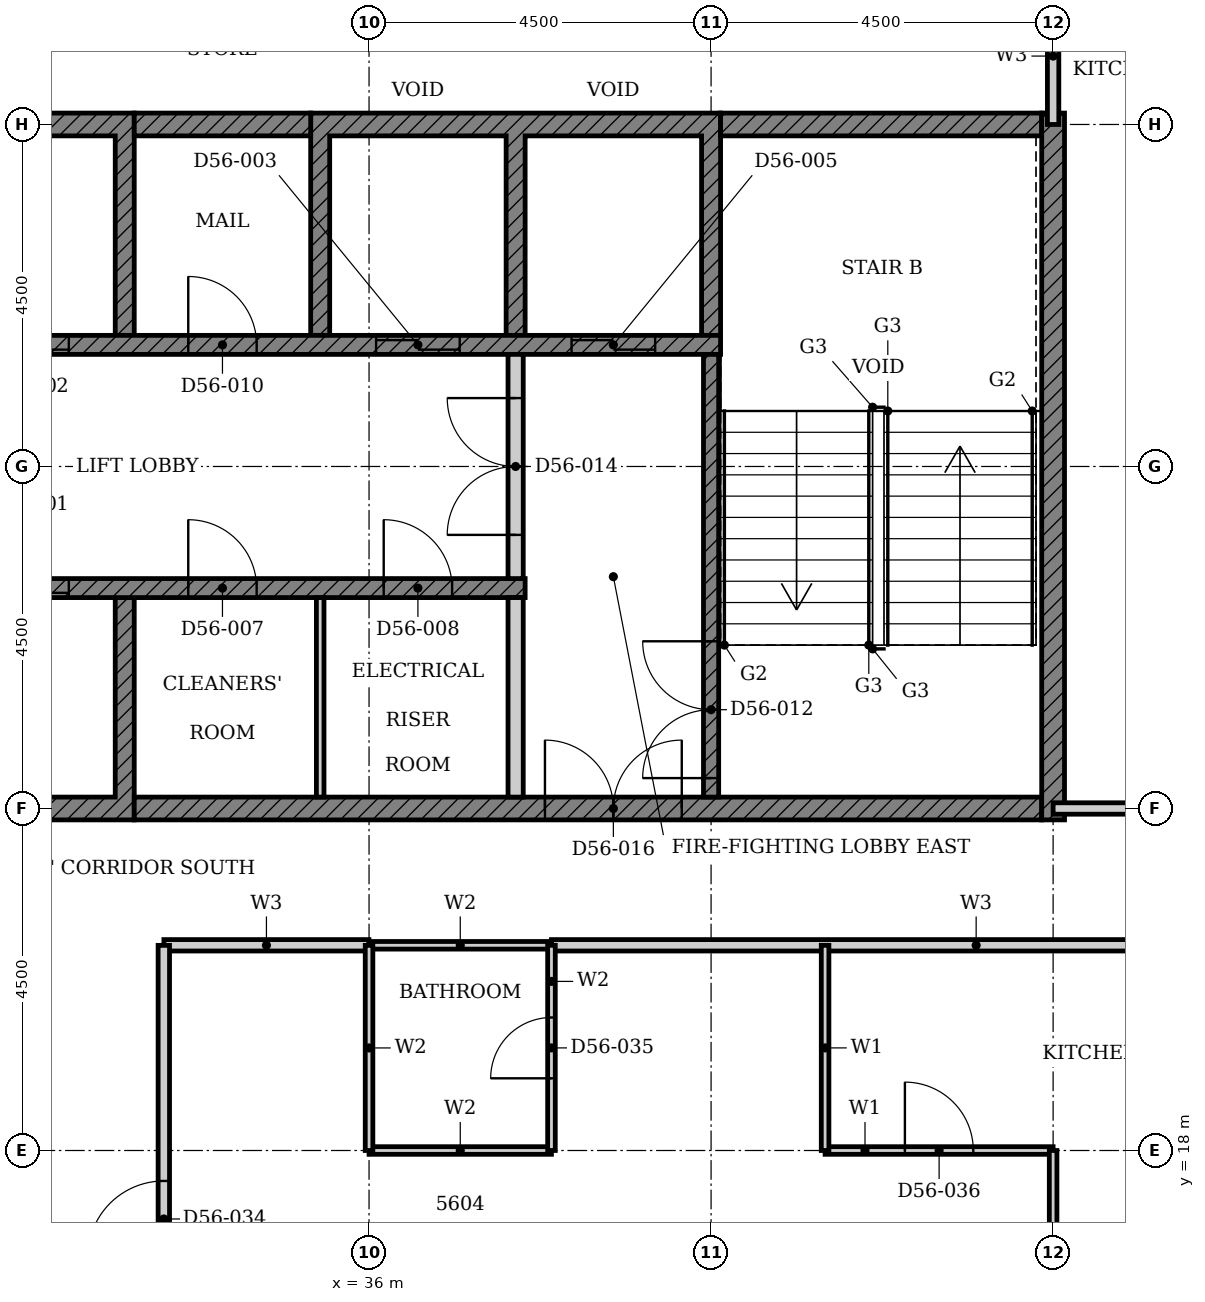
"""IFC4 building model, lengths in metres.
Left out: names, types, materials, properties, quantities, classifications, styles, units other than length and angle.
Written with IfcOpenShell. Run it as: python <this file> out.ifc"""

import sys

from ifc_helpers import new_model, si_unit, direction, frame, frame_2d, origin, place, context, subcontext, project, spatial, polyline, rectangle, outline, extrude, element, fill, save


model = new_model("IFC4")
c1 = context("Model", 3, precision=1e-05, world=origin(), true_north=direction((0.0, 1.0)))
c2 = subcontext(c1, "Body", "Model", "MODEL_VIEW")
j1 = project(units=[si_unit("LENGTHUNIT", "METRE"), si_unit("PLANEANGLEUNIT", "RADIAN")], contexts=[c1])
p1 = place(None, origin())
s1 = spatial("IfcSite", under=j1, at=p1, CompositionType="ELEMENT")
p2 = place(p1, origin())
s2 = spatial("IfcBuilding", under=s1, at=p2, CompositionType="ELEMENT")
p3 = place(p2, frame((0.0, 0.0, 222.0)))
s3 = spatial("IfcBuildingStorey", under=s2, at=p3, CompositionType="ELEMENT", Elevation=222.0)
p4 = place(p3, origin())
e1 = element("IfcWall", 1, at=p4, inside=s3, PredefinedType="SHEAR", context=c2, shape_type="SweptSolid", body=[
    extrude(outline(polyline([(27.518, 22.35), (32.911, 22.35), (32.911, 25.275), (32.661, 25.275), (32.661, 22.65), (30.339, 22.65), (30.339, 25.275), (30.089, 25.275), (30.089, 22.65), (27.768, 22.65), (27.768, 25.275), (27.518, 25.275), (27.518, 22.35)])), origin(), (0.0, 0.0, 1.0), 3.4),
])
p5 = place(p3, origin())
e2 = element("IfcWall", 2, at=p5, inside=s3, PredefinedType="SHEAR", context=c2, shape_type="SweptSolid", body=[
    extrude(outline(polyline([(27.518, 28.725), (27.768, 28.725), (27.768, 31.35), (30.089, 31.35), (30.089, 28.725), (30.339, 28.725), (30.339, 31.35), (32.661, 31.35), (32.661, 28.725), (32.911, 28.725), (32.911, 31.65), (27.518, 31.65), (27.518, 28.725)])), origin(), (0.0, 0.0, 1.0), 3.4),
])
p6 = place(p3, origin())
e3 = element("IfcWall", 3, at=p6, inside=s3, PredefinedType="SHEAR", context=c2, shape_type="SweptSolid", body=[
    extrude(outline(polyline([(35.232, 28.725), (35.482, 28.725), (35.482, 31.35), (37.803, 31.35), (37.803, 28.725), (38.053, 28.725), (38.053, 31.35), (40.375, 31.35), (40.375, 28.725), (40.625, 28.725), (40.625, 31.65), (35.232, 31.65), (35.232, 28.725)])), origin(), (0.0, 0.0, 1.0), 3.4),
])
p7 = place(p3, frame((32.911, 22.5, 0.0), z_axis=(0.0, 0.0, 1.0), x_axis=(1.0, 0.0, 0.0)))
e4 = element("IfcWall", 4, at=p7, inside=s3, PredefinedType="SHEAR", context=c2, shape_type="SweptSolid", body=[
    extrude(rectangle(XDim=11.939, YDim=0.3, at=frame_2d((5.97, 0.0))), origin(), (0.0, 0.0, 1.0), 3.4),
])
p8 = place(p7, frame((5.404, 0.0, 0.0)))
e5 = element("IfcOpeningElement", 5, at=p8, cuts=e4, PredefinedType="OPENING", context=c2, shape_type="SweptSolid", body=[
    extrude(rectangle(XDim=1.8, YDim=2.1, at=frame_2d((0.9, 1.05))), frame((0.0, 0.16, 0.0), z_axis=(0.0, -1.0, 0.0), x_axis=(1.0, 0.0, 0.0)), (0.0, 0.0, 1.0), 0.32),
])
p9 = place(p3, frame((32.911, 31.5, 0.0), z_axis=(0.0, 0.0, 1.0), x_axis=(1.0, 0.0, 0.0)))
e6 = element("IfcWall", 6, at=p9, inside=s3, PredefinedType="SHEAR", context=c2, shape_type="SweptSolid", body=[
    extrude(rectangle(XDim=2.322, YDim=0.3, at=frame_2d((1.161, 0.0))), origin(), (0.0, 0.0, 1.0), 3.4),
])
p10 = place(p3, frame((40.625, 31.5, 0.0), z_axis=(0.0, 0.0, 1.0), x_axis=(1.0, 0.0, 0.0)))
e7 = element("IfcWall", 7, at=p10, inside=s3, PredefinedType="SHEAR", context=c2, shape_type="SweptSolid", body=[
    extrude(rectangle(XDim=4.225, YDim=0.3, at=frame_2d((2.113, 0.0))), origin(), (0.0, 0.0, 1.0), 3.4),
])
p11 = place(p3, frame((45.0, 22.35, 0.0), z_axis=(0.0, 0.0, 1.0), x_axis=(0.0, 1.0, 0.0)))
e8 = element("IfcWall", 8, at=p11, inside=s3, PredefinedType="SHEAR", context=c2, shape_type="SweptSolid", body=[
    extrude(rectangle(XDim=9.3, YDim=0.3, at=frame_2d((4.65, 0.0))), origin(), (0.0, 0.0, 1.0), 3.4),
])
p12 = place(p3, frame((22.375, 25.4, 0.0), z_axis=(0.0, 0.0, 1.0), x_axis=(1.0, 0.0, 0.0)))
e9 = element("IfcWall", 9, at=p12, inside=s3, PredefinedType="SHEAR", context=c2, shape_type="SweptSolid", body=[
    extrude(rectangle(XDim=15.678, YDim=0.25, at=frame_2d((7.839, 0.0))), origin(), (0.0, 0.0, 1.0), 3.4),
])
p13 = place(p12, frame((8.575, 0.0, 0.0)))
e10 = element("IfcOpeningElement", 10, at=p13, cuts=e9, PredefinedType="OPENING", context=c2, shape_type="SweptSolid", body=[
    extrude(rectangle(XDim=1.1, YDim=2.1, at=frame_2d((0.55, 1.05))), frame((0.0, 0.135, 0.0), z_axis=(0.0, -1.0, 0.0), x_axis=(1.0, 0.0, 0.0)), (0.0, 0.0, 1.0), 0.27),
])
p14 = place(p12, frame((0.861, 0.0, 0.0)))
e11 = element("IfcOpeningElement", 11, at=p14, cuts=e9, PredefinedType="OPENING", context=c2, shape_type="SweptSolid", body=[
    extrude(rectangle(XDim=1.1, YDim=2.1, at=frame_2d((0.55, 1.05))), frame((0.0, 0.135, 0.0), z_axis=(0.0, -1.0, 0.0), x_axis=(1.0, 0.0, 0.0)), (0.0, 0.0, 1.0), 0.27),
])
p15 = place(p12, frame((3.532, 0.0, 0.0)))
e12 = element("IfcOpeningElement", 12, at=p15, cuts=e9, PredefinedType="OPENING", context=c2, shape_type="SweptSolid", body=[
    extrude(rectangle(XDim=0.9, YDim=2.1, at=frame_2d((0.45, 1.05))), frame((0.0, 0.135, 0.0), z_axis=(0.0, -1.0, 0.0), x_axis=(1.0, 0.0, 0.0)), (0.0, 0.0, 1.0), 0.27),
])
p16 = place(p12, frame((11.246, 0.0, 0.0)))
e13 = element("IfcOpeningElement", 13, at=p16, cuts=e9, PredefinedType="OPENING", context=c2, shape_type="SweptSolid", body=[
    extrude(rectangle(XDim=0.9, YDim=2.1, at=frame_2d((0.45, 1.05))), frame((0.0, 0.135, 0.0), z_axis=(0.0, -1.0, 0.0), x_axis=(1.0, 0.0, 0.0)), (0.0, 0.0, 1.0), 0.27),
])
p17 = place(p12, frame((13.818, 0.0, 0.0)))
e14 = element("IfcOpeningElement", 14, at=p17, cuts=e9, PredefinedType="OPENING", context=c2, shape_type="SweptSolid", body=[
    extrude(rectangle(XDim=0.9, YDim=2.1, at=frame_2d((0.45, 1.05))), frame((0.0, 0.135, 0.0), z_axis=(0.0, -1.0, 0.0), x_axis=(1.0, 0.0, 0.0)), (0.0, 0.0, 1.0), 0.27),
])
p18 = place(p3, frame((24.947, 28.6, 0.0), z_axis=(0.0, 0.0, 1.0), x_axis=(1.0, 0.0, 0.0)))
e15 = element("IfcWall", 15, at=p18, inside=s3, PredefinedType="SHEAR", context=c2, shape_type="SweptSolid", body=[
    extrude(rectangle(XDim=15.678, YDim=0.25, at=frame_2d((7.839, 0.0))), origin(), (0.0, 0.0, 1.0), 3.4),
])
p19 = place(p18, frame((6.004, 0.0, 0.0)))
e16 = element("IfcOpeningElement", 16, at=p19, cuts=e15, PredefinedType="OPENING", context=c2, shape_type="SweptSolid", body=[
    extrude(rectangle(XDim=1.1, YDim=2.1, at=frame_2d((0.55, 1.05))), frame((0.0, 0.135, 0.0), z_axis=(0.0, -1.0, 0.0), x_axis=(1.0, 0.0, 0.0)), (0.0, 0.0, 1.0), 0.27),
])
p20 = place(p18, frame((11.146, 0.0, 0.0)))
e17 = element("IfcOpeningElement", 17, at=p20, cuts=e15, PredefinedType="OPENING", context=c2, shape_type="SweptSolid", body=[
    extrude(rectangle(XDim=1.1, YDim=2.1, at=frame_2d((0.55, 1.05))), frame((0.0, 0.135, 0.0), z_axis=(0.0, -1.0, 0.0), x_axis=(1.0, 0.0, 0.0)), (0.0, 0.0, 1.0), 0.27),
])
p21 = place(p18, frame((13.718, 0.0, 0.0)))
e18 = element("IfcOpeningElement", 18, at=p21, cuts=e15, PredefinedType="OPENING", context=c2, shape_type="SweptSolid", body=[
    extrude(rectangle(XDim=1.1, YDim=2.1, at=frame_2d((0.55, 1.05))), frame((0.0, 0.135, 0.0), z_axis=(0.0, -1.0, 0.0), x_axis=(1.0, 0.0, 0.0)), (0.0, 0.0, 1.0), 0.27),
])
p22 = place(p18, frame((0.961, 0.0, 0.0)))
e19 = element("IfcOpeningElement", 19, at=p22, cuts=e15, PredefinedType="OPENING", context=c2, shape_type="SweptSolid", body=[
    extrude(rectangle(XDim=0.9, YDim=2.1, at=frame_2d((0.45, 1.05))), frame((0.0, 0.135, 0.0), z_axis=(0.0, -1.0, 0.0), x_axis=(1.0, 0.0, 0.0)), (0.0, 0.0, 1.0), 0.27),
])
p23 = place(p18, frame((8.675, 0.0, 0.0)))
e20 = element("IfcOpeningElement", 20, at=p23, cuts=e15, PredefinedType="OPENING", context=c2, shape_type="SweptSolid", body=[
    extrude(rectangle(XDim=0.9, YDim=2.1, at=frame_2d((0.45, 1.05))), frame((0.0, 0.135, 0.0), z_axis=(0.0, -1.0, 0.0), x_axis=(1.0, 0.0, 0.0)), (0.0, 0.0, 1.0), 0.27),
])
p24 = place(p3, frame((37.928, 22.65, 0.0), z_axis=(0.0, 0.0, 1.0), x_axis=(0.0, 1.0, 0.0)))
e21 = element("IfcWall", 21, at=p24, inside=s3, PredefinedType="PARTITIONING", context=c2, shape_type="SweptSolid", body=[
    extrude(rectangle(XDim=2.625, YDim=0.2, at=frame_2d((1.312, 0.0))), origin(), (0.0, 0.0, 1.0), 3.4),
])
p25 = place(p3, frame((35.357, 22.65, 0.0), z_axis=(0.0, 0.0, 1.0), x_axis=(0.0, 1.0, 0.0)))
e22 = element("IfcWall", 22, at=p25, inside=s3, PredefinedType="PARTITIONING", context=c2, shape_type="SweptSolid", body=[
    extrude(rectangle(XDim=2.625, YDim=0.1, at=frame_2d((1.312, 0.0))), origin(), (0.0, 0.0, 1.0), 3.4),
])
p26 = place(p3, frame((40.5, 22.65, 0.0), z_axis=(0.0, 0.0, 1.0), x_axis=(0.0, 1.0, 0.0)))
e23 = element("IfcWall", 23, at=p26, inside=s3, PredefinedType="SHEAR", context=c2, shape_type="SweptSolid", body=[
    extrude(rectangle(XDim=5.825, YDim=0.2, at=frame_2d((2.913, 0.0))), origin(), (0.0, 0.0, 1.0), 3.4),
])
p27 = place(p26, frame((0.25, 0.0, 0.0)))
e24 = element("IfcOpeningElement", 24, at=p27, cuts=e23, PredefinedType="OPENING", context=c2, shape_type="SweptSolid", body=[
    extrude(rectangle(XDim=1.8, YDim=2.1, at=frame_2d((0.9, 1.05))), frame((0.0, 0.11, 0.0), z_axis=(0.0, -1.0, 0.0), x_axis=(1.0, 0.0, 0.0)), (0.0, 0.0, 1.0), 0.22),
])
p28 = place(p3, frame((37.928, 25.525, 0.0), z_axis=(0.0, 0.0, 1.0), x_axis=(0.0, 1.0, 0.0)))
e25 = element("IfcWall", 25, at=p28, inside=s3, PredefinedType="PARTITIONING", context=c2, shape_type="SweptSolid", body=[
    extrude(rectangle(XDim=2.95, YDim=0.2, at=frame_2d((1.475, 0.0))), origin(), (0.0, 0.0, 1.0), 3.4),
])
p29 = place(p28, frame((0.575, 0.0, 0.0)))
e26 = element("IfcOpeningElement", 26, at=p29, cuts=e25, PredefinedType="OPENING", context=c2, shape_type="SweptSolid", body=[
    extrude(rectangle(XDim=1.8, YDim=2.1, at=frame_2d((0.9, 1.05))), frame((0.0, 0.11, 0.0), z_axis=(0.0, -1.0, 0.0), x_axis=(1.0, 0.0, 0.0)), (0.0, 0.0, 1.0), 0.22),
])
p30 = place(p3, frame((33.301, 20.7, 0.0), z_axis=(0.0, 0.0, 1.0), x_axis=(1.0, 0.0, 0.0)))
e27 = element("IfcWall", 27, at=p30, inside=s3, PredefinedType="PARTITIONING", context=c2, shape_type="SweptSolid", body=[
    extrude(rectangle(XDim=2.698, YDim=0.15, at=frame_2d((1.349, 0.0))), origin(), (0.0, 0.0, 1.0), 3.4),
])
p31 = place(p3, frame((38.4, 20.7, 0.0), z_axis=(0.0, 0.0, 1.0), x_axis=(1.0, 0.0, 0.0)))
e28 = element("IfcWall", 28, at=p31, inside=s3, PredefinedType="PARTITIONING", context=c2, shape_type="SweptSolid", body=[
    extrude(rectangle(XDim=11.175, YDim=0.15, at=frame_2d((5.587, 0.0))), origin(), (0.0, 0.0, 1.0), 3.4),
])
p32 = place(p3, frame((45.0, 22.5, 0.0), z_axis=(0.0, 0.0, 1.0), x_axis=(1.0, 0.0, 0.0)))
e29 = element("IfcWall", 29, at=p32, inside=s3, PredefinedType="PARTITIONING", context=c2, shape_type="SweptSolid", body=[
    extrude(rectangle(XDim=4.765, YDim=0.15, at=frame_2d((2.382, 0.0))), origin(), (0.0, 0.0, 1.0), 3.4),
])
p33 = place(p32, frame((1.75, 0.0, 0.0)))
e30 = element("IfcOpeningElement", 30, at=p33, cuts=e29, PredefinedType="OPENING", context=c2, shape_type="SweptSolid", body=[
    extrude(rectangle(XDim=1.0, YDim=2.2, at=frame_2d((0.5, 1.1))), frame((0.0, 0.085, 0.0), z_axis=(0.0, -1.0, 0.0), x_axis=(1.0, 0.0, 0.0)), (0.0, 0.0, 1.0), 0.17),
])
p34 = place(p3, frame((33.3, 6.9, 0.0), z_axis=(0.0, 0.0, 1.0), x_axis=(0.0, 1.0, 0.0)))
e31 = element("IfcWall", 31, at=p34, inside=s3, PredefinedType="PARTITIONING", context=c2, shape_type="SweptSolid", body=[
    extrude(rectangle(XDim=13.799, YDim=0.15, at=frame_2d((6.899, 0.0))), origin(), (0.0, 0.0, 1.0), 3.4),
])
p35 = place(p34, frame((9.699, 0.0, 0.0)))
e32 = element("IfcOpeningElement", 32, at=p35, cuts=e31, PredefinedType="OPENING", context=c2, shape_type="SweptSolid", body=[
    extrude(rectangle(XDim=1.0, YDim=2.2, at=frame_2d((0.5, 1.1))), frame((0.0, 0.085, 0.0), z_axis=(0.0, -1.0, 0.0), x_axis=(1.0, 0.0, 0.0)), (0.0, 0.0, 1.0), 0.17),
])
p36 = place(p34, frame((1.3, 0.0, 0.0)))
e33 = element("IfcOpeningElement", 33, at=p36, cuts=e31, PredefinedType="OPENING", context=c2, shape_type="SweptSolid", body=[
    extrude(rectangle(XDim=1.0, YDim=2.2, at=frame_2d((0.5, 1.1))), frame((0.0, 0.085, 0.0), z_axis=(0.0, -1.0, 0.0), x_axis=(1.0, 0.0, 0.0)), (0.0, 0.0, 1.0), 0.17),
])
p37 = place(p3, frame((45.0, 31.5, 0.0), z_axis=(0.0, 0.0, 1.0), x_axis=(0.0, 1.0, 0.0)))
e34 = element("IfcWall", 34, at=p37, inside=s3, PredefinedType="PARTITIONING", context=c2, shape_type="SweptSolid", body=[
    extrude(rectangle(XDim=1.8, YDim=0.15, at=frame_2d((0.9, 0.0))), origin(), (0.0, 0.0, 1.0), 3.4),
])
p38 = place(p3, frame((42.0, 18.0, 0.0), z_axis=(0.0, 0.0, 1.0), x_axis=(1.0, 0.0, 0.0)))
e35 = element("IfcWall", 35, at=p38, inside=s3, PredefinedType="PARTITIONING", context=c2, shape_type="SweptSolid", body=[
    extrude(rectangle(XDim=3.0, YDim=0.1, at=frame_2d((1.5, 0.0))), origin(), (0.0, 0.0, 1.0), 3.4),
])
p39 = place(p38, frame((1.05, 0.0, 0.0)))
e36 = element("IfcOpeningElement", 36, at=p39, cuts=e35, PredefinedType="OPENING", context=c2, shape_type="SweptSolid", body=[
    extrude(rectangle(XDim=0.9, YDim=2.1, at=frame_2d((0.45, 1.05))), frame((0.0, 0.06, 0.0), z_axis=(0.0, -1.0, 0.0), x_axis=(1.0, 0.0, 0.0)), (0.0, 0.0, 1.0), 0.12),
])
p40 = place(p3, frame((42.0, 18.0, 0.0), z_axis=(0.0, 0.0, 1.0), x_axis=(0.0, 1.0, 0.0)))
e37 = element("IfcWall", 37, at=p40, inside=s3, PredefinedType="PARTITIONING", context=c2, shape_type="SweptSolid", body=[
    extrude(rectangle(XDim=2.7, YDim=0.1, at=frame_2d((1.35, 0.0))), origin(), (0.0, 0.0, 1.0), 3.4),
])
p41 = place(p3, frame((45.0, 15.56, 0.0), z_axis=(0.0, 0.0, 1.0), x_axis=(0.0, 1.0, 0.0)))
e38 = element("IfcWall", 38, at=p41, inside=s3, PredefinedType="PARTITIONING", context=c2, shape_type="SweptSolid", body=[
    extrude(rectangle(XDim=2.44, YDim=0.1, at=frame_2d((1.22, 0.0))), origin(), (0.0, 0.0, 1.0), 3.4),
])
for number, where, z_axis, x_axis in (
    (39, (36.0, 18.0, 0.0), (0.0, 0.0, 1.0), (1.0, 0.0, 0.0)),
    (40, (36.0, 20.7, 0.0), (0.0, 0.0, 1.0), (1.0, 0.0, 0.0)),
):
    element("IfcWall", number, at=place(p3, frame(where, z_axis=z_axis, x_axis=x_axis)), inside=s3, PredefinedType="PARTITIONING", context=c2, shape_type="SweptSolid", body=[
        extrude(rectangle(XDim=2.4, YDim=0.1, at=frame_2d((1.2, 0.0))), origin(), (0.0, 0.0, 1.0), 3.4),
    ])
p42 = place(p3, frame((36.0, 18.0, 0.0), z_axis=(0.0, 0.0, 1.0), x_axis=(0.0, 1.0, 0.0)))
e41 = element("IfcWall", 41, at=p42, inside=s3, PredefinedType="PARTITIONING", context=c2, shape_type="SweptSolid", body=[
    extrude(rectangle(XDim=2.699, YDim=0.1, at=frame_2d((1.35, 0.0))), origin(), (0.0, 0.0, 1.0), 3.4),
])
p43 = place(p3, frame((38.4, 18.0, 0.0), z_axis=(0.0, 0.0, 1.0), x_axis=(0.0, 1.0, 0.0)))
e42 = element("IfcWall", 42, at=p43, inside=s3, PredefinedType="PARTITIONING", context=c2, shape_type="SweptSolid", body=[
    extrude(rectangle(XDim=2.7, YDim=0.1, at=frame_2d((1.35, 0.0))), origin(), (0.0, 0.0, 1.0), 3.4),
])
p44 = place(p43, frame((0.95, 0.0, 0.0)))
e43 = element("IfcOpeningElement", 43, at=p44, cuts=e42, PredefinedType="OPENING", context=c2, shape_type="SweptSolid", body=[
    extrude(rectangle(XDim=0.8, YDim=2.1, at=frame_2d((0.4, 1.05))), frame((0.0, 0.06, 0.0), z_axis=(0.0, -1.0, 0.0), x_axis=(1.0, 0.0, 0.0)), (0.0, 0.0, 1.0), 0.12),
])
p45 = place(p13, origin())
e44 = element("IfcDoor", 44, at=p45, inside=s3, OperationType="DOUBLE_DOOR_SLIDING", PredefinedType="DOOR", context=c2, shape_type="SweptSolid", body=[
    extrude(rectangle(XDim=1.1, YDim=2.1, at=frame_2d((0.55, 1.05))), frame((0.0, 0.025, 0.0), z_axis=(0.0, -1.0, 0.0), x_axis=(1.0, 0.0, 0.0)), (0.0, 0.0, 1.0), 0.05),
])
fill(e10, e44)
p46 = place(p19, origin())
e45 = element("IfcDoor", 45, at=p46, inside=s3, OperationType="DOUBLE_DOOR_SLIDING", PredefinedType="DOOR", context=c2, shape_type="SweptSolid", body=[
    extrude(rectangle(XDim=1.1, YDim=2.1, at=frame_2d((0.55, 1.05))), frame((0.0, 0.025, 0.0), z_axis=(0.0, -1.0, 0.0), x_axis=(1.0, 0.0, 0.0)), (0.0, 0.0, 1.0), 0.05),
])
fill(e16, e45)
p47 = place(p20, origin())
e46 = element("IfcDoor", 46, at=p47, inside=s3, OperationType="DOUBLE_DOOR_SLIDING", PredefinedType="DOOR", context=c2, shape_type="SweptSolid", body=[
    extrude(rectangle(XDim=1.1, YDim=2.1, at=frame_2d((0.55, 1.05))), frame((0.0, 0.025, 0.0), z_axis=(0.0, -1.0, 0.0), x_axis=(1.0, 0.0, 0.0)), (0.0, 0.0, 1.0), 0.05),
])
fill(e17, e46)
p48 = place(p21, origin())
e47 = element("IfcDoor", 47, at=p48, inside=s3, OperationType="DOUBLE_DOOR_SLIDING", PredefinedType="DOOR", context=c2, shape_type="SweptSolid", body=[
    extrude(rectangle(XDim=1.1, YDim=2.1, at=frame_2d((0.55, 1.05))), frame((0.0, 0.025, 0.0), z_axis=(0.0, -1.0, 0.0), x_axis=(1.0, 0.0, 0.0)), (0.0, 0.0, 1.0), 0.05),
])
fill(e18, e47)
p49 = place(p16, origin())
e48 = element("IfcDoor", 48, at=p49, inside=s3, OperationType="SINGLE_SWING_LEFT", PredefinedType="DOOR", context=c2, shape_type="SweptSolid", body=[
    extrude(rectangle(XDim=0.9, YDim=2.1, at=frame_2d((0.45, 1.05))), frame((0.0, 0.025, 0.0), z_axis=(0.0, -1.0, 0.0), x_axis=(1.0, 0.0, 0.0)), (0.0, 0.0, 1.0), 0.05),
])
fill(e13, e48)
p50 = place(p17, origin())
e49 = element("IfcDoor", 49, at=p50, inside=s3, OperationType="SINGLE_SWING_LEFT", PredefinedType="DOOR", context=c2, shape_type="SweptSolid", body=[
    extrude(rectangle(XDim=0.9, YDim=2.1, at=frame_2d((0.45, 1.05))), frame((0.0, 0.025, 0.0), z_axis=(0.0, -1.0, 0.0), x_axis=(1.0, 0.0, 0.0)), (0.0, 0.0, 1.0), 0.05),
])
fill(e14, e49)
p51 = place(p23, origin())
e50 = element("IfcDoor", 50, at=p51, inside=s3, OperationType="SINGLE_SWING_LEFT", PredefinedType="DOOR", context=c2, shape_type="SweptSolid", body=[
    extrude(rectangle(XDim=0.9, YDim=2.1, at=frame_2d((0.45, 1.05))), frame((0.0, 0.025, 0.0), z_axis=(0.0, -1.0, 0.0), x_axis=(1.0, 0.0, 0.0)), (0.0, 0.0, 1.0), 0.05),
])
fill(e20, e50)
p52 = place(p27, origin())
e51 = element("IfcDoor", 51, at=p52, inside=s3, OperationType="DOUBLE_DOOR_SINGLE_SWING", PredefinedType="DOOR", context=c2, shape_type="SweptSolid", body=[
    extrude(rectangle(XDim=1.8, YDim=2.1, at=frame_2d((0.9, 1.05))), frame((0.0, 0.025, 0.0), z_axis=(0.0, -1.0, 0.0), x_axis=(1.0, 0.0, 0.0)), (0.0, 0.0, 1.0), 0.05),
])
fill(e24, e51)
p53 = place(p29, origin())
e52 = element("IfcDoor", 52, at=p53, inside=s3, OperationType="DOUBLE_DOOR_SINGLE_SWING", PredefinedType="DOOR", context=c2, shape_type="SweptSolid", body=[
    extrude(rectangle(XDim=1.8, YDim=2.1, at=frame_2d((0.9, 1.05))), frame((0.0, 0.025, 0.0), z_axis=(0.0, -1.0, 0.0), x_axis=(1.0, 0.0, 0.0)), (0.0, 0.0, 1.0), 0.05),
])
fill(e26, e52)
p54 = place(p8, origin())
e53 = element("IfcDoor", 53, at=p54, inside=s3, OperationType="DOUBLE_DOOR_SINGLE_SWING", PredefinedType="DOOR", context=c2, shape_type="SweptSolid", body=[
    extrude(rectangle(XDim=1.8, YDim=2.1, at=frame_2d((0.9, 1.05))), frame((0.0, 0.025, 0.0), z_axis=(0.0, -1.0, 0.0), x_axis=(1.0, 0.0, 0.0)), (0.0, 0.0, 1.0), 0.05),
])
fill(e5, e53)
p55 = place(p35, origin())
e54 = element("IfcDoor", 54, at=p55, inside=s3, OperationType="SINGLE_SWING_LEFT", PredefinedType="DOOR", context=c2, shape_type="SweptSolid", body=[
    extrude(rectangle(XDim=1.0, YDim=2.2, at=frame_2d((0.5, 1.1))), frame((0.0, 0.025, 0.0), z_axis=(0.0, -1.0, 0.0), x_axis=(1.0, 0.0, 0.0)), (0.0, 0.0, 1.0), 0.05),
])
fill(e32, e54)
p56 = place(p44, origin())
e55 = element("IfcDoor", 55, at=p56, inside=s3, OperationType="SINGLE_SWING_RIGHT", PredefinedType="DOOR", context=c2, shape_type="SweptSolid", body=[
    extrude(rectangle(XDim=0.8, YDim=2.1, at=frame_2d((0.4, 1.05))), frame((0.0, 0.025, 0.0), z_axis=(0.0, -1.0, 0.0), x_axis=(1.0, 0.0, 0.0)), (0.0, 0.0, 1.0), 0.05),
])
fill(e43, e55)
p57 = place(p39, origin())
e56 = element("IfcDoor", 56, at=p57, inside=s3, OperationType="SINGLE_SWING_LEFT", PredefinedType="DOOR", context=c2, shape_type="SweptSolid", body=[
    extrude(rectangle(XDim=0.9, YDim=2.1, at=frame_2d((0.45, 1.05))), frame((0.0, 0.025, 0.0), z_axis=(0.0, -1.0, 0.0), x_axis=(1.0, 0.0, 0.0)), (0.0, 0.0, 1.0), 0.05),
])
fill(e36, e56)
save(model, sys.argv[1])
